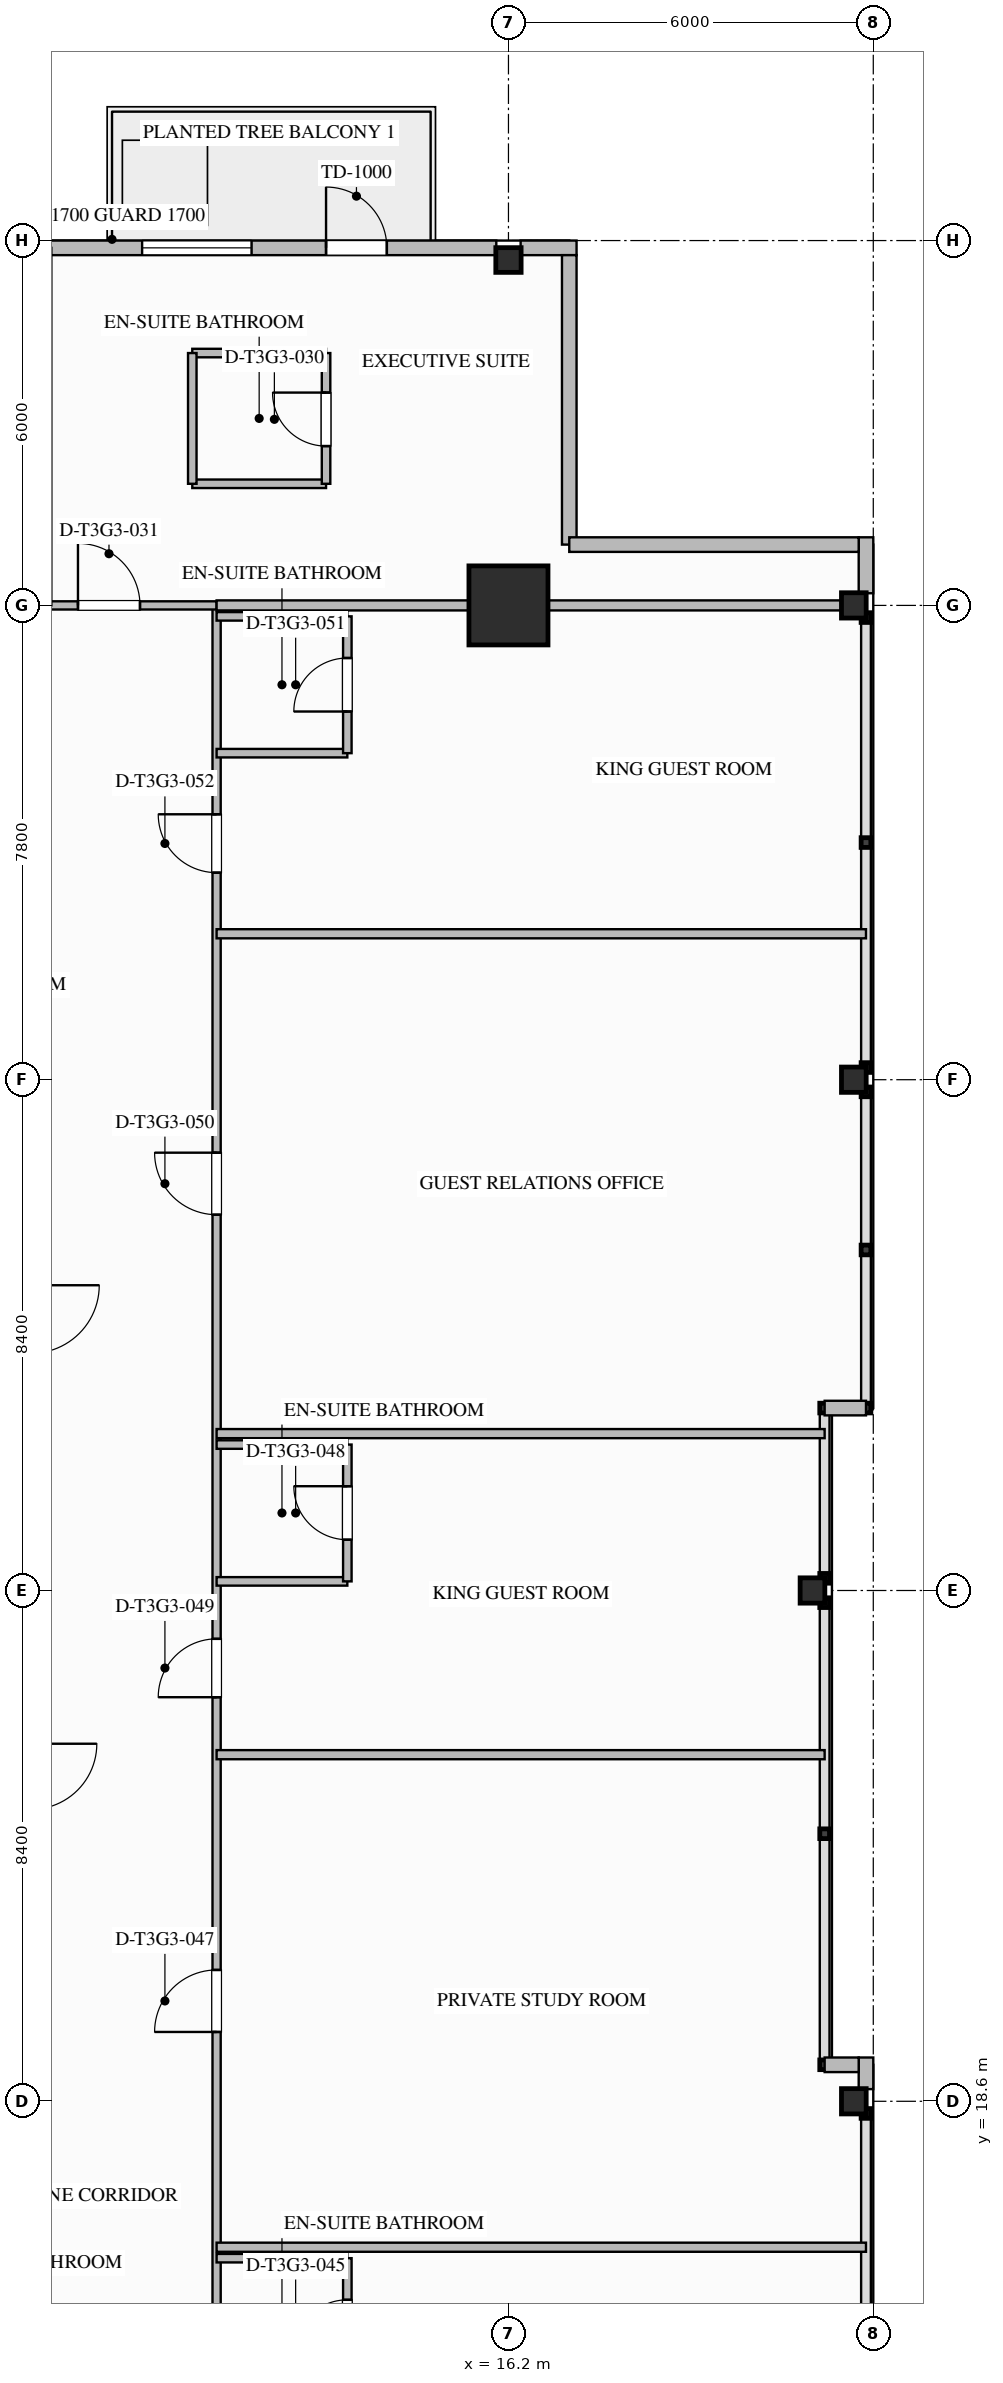
"""IFC4 building model, lengths in metres.
Left out: names, types, materials, properties, quantities, classifications, styles, units other than length and angle.
Written with IfcOpenShell. Run it as: python <this file> out.ifc"""

import sys

from ifc_helpers import new_model, si_unit, direction, frame, frame_2d, origin, origin_2d, place, context, subcontext, project, spatial, rectangle, i_section, extrude, element, fill, save


model = new_model("IFC4")
c1 = context("Model", 3, precision=1e-05, world=origin(), true_north=direction((0.0, 1.0)))
c2 = subcontext(c1, "Body", "Model", "MODEL_VIEW")
j1 = project(units=[si_unit("LENGTHUNIT", "METRE"), si_unit("PLANEANGLEUNIT", "RADIAN")], contexts=[c1])
p1 = place(None, origin())
s1 = spatial("IfcSite", under=j1, at=p1, CompositionType="ELEMENT")
p2 = place(p1, origin())
s2 = spatial("IfcBuilding", under=s1, at=p2, CompositionType="ELEMENT")
p3 = place(p2, frame((0.0, 0.0, 171.7)))
s3 = spatial("IfcBuildingStorey", under=s2, at=p3, CompositionType="ELEMENT", Elevation=171.7)
p4 = place(p3, frame((16.2, 43.2, 0.0), z_axis=(0.0, 0.0, 1.0), x_axis=(1.0, 0.0, 0.0)))
e1 = element("IfcColumn", 1, at=p4, inside=s3, PredefinedType="COLUMN", context=c2, shape_type="SweptSolid", body=[
    extrude(rectangle(XDim=1.3, YDim=1.3, at=origin_2d()), origin(), (0.0, 0.0, 1.0), 3.55),
])
for number, where, z_axis, x_axis in (
    (2, (21.88, 18.6, 0.0), (0.0, 0.0, 1.0), (1.0, 0.0, 0.0)),
    (3, (21.2, 27.0, 0.0), (0.0, 0.0, 1.0), (1.0, 0.0, 0.0)),
    (4, (21.88, 35.4, 0.0), (0.0, 0.0, 1.0), (1.0, 0.0, 0.0)),
    (5, (21.88, 43.2, 0.0), (0.0, 0.0, 1.0), (1.0, 0.0, 0.0)),
    (6, (16.2, 48.88, 0.0), (0.0, 0.0, 1.0), (0.0, 1.0, 0.0)),
):
    element("IfcColumn", number, at=place(p3, frame(where, z_axis=z_axis, x_axis=x_axis)), inside=s3, PredefinedType="COLUMN", context=c2, shape_type="SweptSolid", body=[
        extrude(i_section(OverallWidth=0.406, OverallDepth=0.416, WebThickness=0.03, FlangeThickness=0.048, FilletRadius=0.028, at=origin_2d()), origin(), (0.0, 0.0, 1.0), 3.547),
    ])
p5 = place(p3, frame((22.08, 44.32, 0.0), z_axis=(0.0, 0.0, 1.0), x_axis=(0.0, -1.0, 0.0)))
e7 = element("IfcWall", 7, at=p5, inside=s3, PredefinedType="STANDARD", context=c2, shape_type="SweptSolid", body=[
    extrude(rectangle(XDim=0.92, YDim=0.24, at=frame_2d((0.46, 0.0))), origin(), (0.0, 0.0, 1.0), 3.29),
])
p6 = place(p3, frame((22.08, 19.32, 0.0), z_axis=(0.0, 0.0, 1.0), x_axis=(0.0, -1.0, 0.0)))
e8 = element("IfcWall", 8, at=p6, inside=s3, PredefinedType="STANDARD", context=c2, shape_type="SweptSolid", body=[
    extrude(rectangle(XDim=0.52, YDim=0.24, at=frame_2d((0.26, 0.0))), origin(), (0.0, 0.0, 1.0), 3.29),
])
p7 = place(p3, frame((8.6, 49.08, 0.0), z_axis=(0.0, 0.0, 1.0), x_axis=(1.0, 0.0, 0.0)))
e9 = element("IfcWall", 9, at=p7, inside=s3, PredefinedType="STANDARD", context=c2, shape_type="SweptSolid", body=[
    extrude(rectangle(XDim=7.4, YDim=0.24, at=frame_2d((3.7, 0.0))), origin(), (0.0, 0.0, 1.0), 2.753),
])
p8 = place(p7, frame((4.6, 0.0, 0.0)))
e10 = element("IfcOpeningElement", 10, at=p8, cuts=e9, PredefinedType="OPENING", context=c2, shape_type="SweptSolid", body=[
    extrude(rectangle(XDim=1.0, YDim=2.2, at=frame_2d((0.5, 1.1))), frame((0.0, 0.13, 0.0), z_axis=(0.0, -1.0, 0.0), x_axis=(1.0, 0.0, 0.0)), (0.0, 0.0, 1.0), 0.26),
])
p9 = place(p7, frame((1.575, 0.0, 0.75)))
e11 = element("IfcOpeningElement", 11, at=p9, cuts=e9, PredefinedType="OPENING", context=c2, shape_type="SweptSolid", body=[
    extrude(rectangle(XDim=1.8, YDim=1.903, at=frame_2d((0.9, 0.952))), frame((0.0, 0.13, 0.0), z_axis=(0.0, -1.0, 0.0), x_axis=(1.0, 0.0, 0.0)), (0.0, 0.0, 1.0), 0.26),
])
p10 = place(p3, frame((16.4, 49.08, 0.0), z_axis=(0.0, 0.0, 1.0), x_axis=(1.0, 0.0, 0.0)))
e12 = element("IfcWall", 12, at=p10, inside=s3, PredefinedType="STANDARD", context=c2, shape_type="SweptSolid", body=[
    extrude(rectangle(XDim=0.92, YDim=0.24, at=frame_2d((0.46, 0.0))), origin(), (0.0, 0.0, 1.0), 3.29),
])
for number, where, z_axis, x_axis in (
    (13, (17.2, 48.96, 0.0), (0.0, 0.0, 1.0), (0.0, -1.0, 0.0)),
    (14, (17.2, 44.2, 0.0), (0.0, 0.0, 1.0), (1.0, 0.0, 0.0)),
):
    element("IfcWall", number, at=place(p3, frame(where, z_axis=z_axis, x_axis=x_axis)), inside=s3, PredefinedType="STANDARD", context=c2, shape_type="SweptSolid", body=[
        extrude(rectangle(XDim=4.76, YDim=0.24, at=frame_2d((2.38, 0.0))), origin(), (0.0, 0.0, 1.0), 3.29),
    ])
p11 = place(p3, frame((22.08, 30.0, 0.0), z_axis=(0.0, 0.0, 1.0), x_axis=(-1.0, 0.0, 0.0)))
e15 = element("IfcWall", 15, at=p11, inside=s3, PredefinedType="STANDARD", context=c2, shape_type="SweptSolid", body=[
    extrude(rectangle(XDim=0.68, YDim=0.24, at=frame_2d((0.34, 0.0))), origin(), (0.0, 0.0, 1.0), 3.29),
])
p12 = place(p3, frame((21.4, 19.2, 0.0), z_axis=(0.0, 0.0, 1.0), x_axis=(1.0, 0.0, 0.0)))
e16 = element("IfcWall", 16, at=p12, inside=s3, PredefinedType="STANDARD", context=c2, shape_type="SweptSolid", body=[
    extrude(rectangle(XDim=0.56, YDim=0.24, at=frame_2d((0.28, 0.0))), origin(), (0.0, 0.0, 1.0), 3.29),
])
p13 = place(p3, frame((11.4, 10.8, 0.0), z_axis=(0.0, 0.0, 1.0), x_axis=(0.0, 1.0, 0.0)))
e17 = element("IfcWall", 17, at=p13, inside=s3, PredefinedType="PARTITIONING", context=c2, shape_type="SweptSolid", body=[
    extrude(rectangle(XDim=32.4, YDim=0.135, at=frame_2d((16.2, 0.0))), origin(), (0.0, 0.0, 1.0), 3.29),
])
p14 = place(p13, frame((1.005, 0.0, 0.0)))
e18 = element("IfcOpeningElement", 18, at=p14, cuts=e17, PredefinedType="OPENING", context=c2, shape_type="SweptSolid", body=[
    extrude(rectangle(XDim=0.96, YDim=2.15, at=frame_2d((0.48, 1.075))), frame((0.0, 0.077, 0.0), z_axis=(0.0, -1.0, 0.0), x_axis=(1.0, 0.0, 0.0)), (0.0, 0.0, 1.0), 0.155),
])
p15 = place(p13, frame((8.94, 0.0, 0.0)))
e19 = element("IfcOpeningElement", 19, at=p15, cuts=e17, PredefinedType="OPENING", context=c2, shape_type="SweptSolid", body=[
    extrude(rectangle(XDim=1.02, YDim=2.15, at=frame_2d((0.51, 1.075))), frame((0.0, 0.077, 0.0), z_axis=(0.0, -1.0, 0.0), x_axis=(1.0, 0.0, 0.0)), (0.0, 0.0, 1.0), 0.155),
])
p16 = place(p13, frame((14.445, 0.0, 0.0)))
e20 = element("IfcOpeningElement", 20, at=p16, cuts=e17, PredefinedType="OPENING", context=c2, shape_type="SweptSolid", body=[
    extrude(rectangle(XDim=0.96, YDim=2.15, at=frame_2d((0.48, 1.075))), frame((0.0, 0.077, 0.0), z_axis=(0.0, -1.0, 0.0), x_axis=(1.0, 0.0, 0.0)), (0.0, 0.0, 1.0), 0.155),
])
p17 = place(p13, frame((22.38, 0.0, 0.0)))
e21 = element("IfcOpeningElement", 21, at=p17, cuts=e17, PredefinedType="OPENING", context=c2, shape_type="SweptSolid", body=[
    extrude(rectangle(XDim=1.02, YDim=2.15, at=frame_2d((0.51, 1.075))), frame((0.0, 0.077, 0.0), z_axis=(0.0, -1.0, 0.0), x_axis=(1.0, 0.0, 0.0)), (0.0, 0.0, 1.0), 0.155),
])
p18 = place(p13, frame((28.005, 0.0, 0.0)))
e22 = element("IfcOpeningElement", 22, at=p18, cuts=e17, PredefinedType="OPENING", context=c2, shape_type="SweptSolid", body=[
    extrude(rectangle(XDim=0.96, YDim=2.15, at=frame_2d((0.48, 1.075))), frame((0.0, 0.077, 0.0), z_axis=(0.0, -1.0, 0.0), x_axis=(1.0, 0.0, 0.0)), (0.0, 0.0, 1.0), 0.155),
])
p19 = place(p3, frame((8.6, 43.2, 0.0), z_axis=(0.0, 0.0, 1.0), x_axis=(1.0, 0.0, 0.0)))
e23 = element("IfcWall", 23, at=p19, inside=s3, PredefinedType="PARTITIONING", context=c2, shape_type="SweptSolid", body=[
    extrude(rectangle(XDim=2.8, YDim=0.135, at=frame_2d((1.4, 0.0))), origin(), (0.0, 0.0, 1.0), 2.58),
])
p20 = place(p19, frame((0.52, 0.0, 0.0)))
e24 = element("IfcOpeningElement", 24, at=p20, cuts=e23, PredefinedType="OPENING", context=c2, shape_type="SweptSolid", body=[
    extrude(rectangle(XDim=1.02, YDim=2.15, at=frame_2d((0.51, 1.075))), frame((0.0, 0.077, 0.0), z_axis=(0.0, -1.0, 0.0), x_axis=(1.0, 0.0, 0.0)), (0.0, 0.0, 1.0), 0.155),
])
p21 = place(p3, frame((11.4, 43.2, 0.0), z_axis=(0.0, 0.0, 1.0), x_axis=(1.0, 0.0, 0.0)))
e25 = element("IfcWall", 25, at=p21, inside=s3, PredefinedType="PARTITIONING", context=c2, shape_type="SweptSolid", body=[
    extrude(rectangle(XDim=10.68, YDim=0.165, at=frame_2d((5.34, 0.0))), origin(), (0.0, 0.0, 1.0), 2.58),
])
for number, where, z_axis, x_axis in (
    (26, (11.0, 45.2, 0.0), (0.0, 0.0, 1.0), (1.0, 0.0, 0.0)),
    (27, (11.0, 47.35, 0.0), (0.0, 0.0, 1.0), (1.0, 0.0, 0.0)),
):
    element("IfcWall", number, at=place(p3, frame(where, z_axis=z_axis, x_axis=x_axis)), inside=s3, PredefinedType="PLUMBINGWALL", context=c2, shape_type="SweptSolid", body=[
        extrude(rectangle(XDim=2.2, YDim=0.14, at=frame_2d((1.1, 0.0))), origin(), (0.0, 0.0, 1.0), 3.29),
    ])
p22 = place(p3, frame((11.0, 45.2, 0.0), z_axis=(0.0, 0.0, 1.0), x_axis=(0.0, 1.0, 0.0)))
e28 = element("IfcWall", 28, at=p22, inside=s3, PredefinedType="PLUMBINGWALL", context=c2, shape_type="SweptSolid", body=[
    extrude(rectangle(XDim=2.15, YDim=0.14, at=frame_2d((1.075, 0.0))), origin(), (0.0, 0.0, 1.0), 3.29),
])
p23 = place(p3, frame((13.2, 45.2, 0.0), z_axis=(0.0, 0.0, 1.0), x_axis=(0.0, 1.0, 0.0)))
e29 = element("IfcWall", 29, at=p23, inside=s3, PredefinedType="PLUMBINGWALL", context=c2, shape_type="SweptSolid", body=[
    extrude(rectangle(XDim=2.15, YDim=0.14, at=frame_2d((1.075, 0.0))), origin(), (0.0, 0.0, 1.0), 3.29),
])
p24 = place(p23, frame((0.62, 0.0, 0.0)))
e30 = element("IfcOpeningElement", 30, at=p24, cuts=e29, PredefinedType="OPENING", context=c2, shape_type="SweptSolid", body=[
    extrude(rectangle(XDim=0.88, YDim=2.1, at=frame_2d((0.44, 1.05))), frame((0.0, 0.08, 0.0), z_axis=(0.0, -1.0, 0.0), x_axis=(1.0, 0.0, 0.0)), (0.0, 0.0, 1.0), 0.16),
])
p25 = place(p3, frame((11.4, 16.02, 0.0), z_axis=(0.0, 0.0, 1.0), x_axis=(1.0, 0.0, 0.0)))
e31 = element("IfcWall", 31, at=p25, inside=s3, PredefinedType="PLUMBINGWALL", context=c2, shape_type="SweptSolid", body=[
    extrude(rectangle(XDim=2.15, YDim=0.14, at=frame_2d((1.075, 0.0))), origin(), (0.0, 0.0, 1.0), 3.29),
])
p26 = place(p3, frame((13.55, 13.77, 0.0), z_axis=(0.0, 0.0, 1.0), x_axis=(0.0, 1.0, 0.0)))
e32 = element("IfcWall", 32, at=p26, inside=s3, PredefinedType="PLUMBINGWALL", context=c2, shape_type="SweptSolid", body=[
    extrude(rectangle(XDim=2.25, YDim=0.14, at=frame_2d((1.125, 0.0))), origin(), (0.0, 0.0, 1.0), 3.29),
])
p27 = place(p26, frame((0.685, 0.0, 0.0)))
e33 = element("IfcOpeningElement", 33, at=p27, cuts=e32, PredefinedType="OPENING", context=c2, shape_type="SweptSolid", body=[
    extrude(rectangle(XDim=0.88, YDim=2.1, at=frame_2d((0.44, 1.05))), frame((0.0, 0.08, 0.0), z_axis=(0.0, -1.0, 0.0), x_axis=(1.0, 0.0, 0.0)), (0.0, 0.0, 1.0), 0.16),
])
p28 = place(p3, frame((11.4, 16.2, 0.0), z_axis=(0.0, 0.0, 1.0), x_axis=(1.0, 0.0, 0.0)))
e34 = element("IfcWall", 34, at=p28, inside=s3, PredefinedType="PARTITIONING", context=c2, shape_type="SweptSolid", body=[
    extrude(rectangle(XDim=10.68, YDim=0.15, at=frame_2d((5.34, 0.0))), origin(), (0.0, 0.0, 1.0), 3.29),
])
p29 = place(p3, frame((11.4, 24.3, 0.0), z_axis=(0.0, 0.0, 1.0), x_axis=(1.0, 0.0, 0.0)))
e35 = element("IfcWall", 35, at=p29, inside=s3, PredefinedType="PARTITIONING", context=c2, shape_type="SweptSolid", body=[
    extrude(rectangle(XDim=10.0, YDim=0.15, at=frame_2d((5.0, 0.0))), origin(), (0.0, 0.0, 1.0), 3.29),
])
p30 = place(p3, frame((11.4, 27.15, 0.0), z_axis=(0.0, 0.0, 1.0), x_axis=(1.0, 0.0, 0.0)))
e36 = element("IfcWall", 36, at=p30, inside=s3, PredefinedType="PLUMBINGWALL", context=c2, shape_type="SweptSolid", body=[
    extrude(rectangle(XDim=2.15, YDim=0.14, at=frame_2d((1.075, 0.0))), origin(), (0.0, 0.0, 1.0), 2.667),
])
p31 = place(p3, frame((11.4, 29.4, 0.0), z_axis=(0.0, 0.0, 1.0), x_axis=(1.0, 0.0, 0.0)))
e37 = element("IfcWall", 37, at=p31, inside=s3, PredefinedType="PLUMBINGWALL", context=c2, shape_type="SweptSolid", body=[
    extrude(rectangle(XDim=2.15, YDim=0.14, at=frame_2d((1.075, 0.0))), origin(), (0.0, 0.0, 1.0), 3.29),
])
p32 = place(p3, frame((13.55, 27.15, 0.0), z_axis=(0.0, 0.0, 1.0), x_axis=(0.0, 1.0, 0.0)))
e38 = element("IfcWall", 38, at=p32, inside=s3, PredefinedType="PLUMBINGWALL", context=c2, shape_type="SweptSolid", body=[
    extrude(rectangle(XDim=2.25, YDim=0.14, at=frame_2d((1.125, 0.0))), origin(), (0.0, 0.0, 1.0), 3.29),
])
p33 = place(p32, frame((0.685, 0.0, 0.0)))
e39 = element("IfcOpeningElement", 39, at=p33, cuts=e38, PredefinedType="OPENING", context=c2, shape_type="SweptSolid", body=[
    extrude(rectangle(XDim=0.88, YDim=2.1, at=frame_2d((0.44, 1.05))), frame((0.0, 0.08, 0.0), z_axis=(0.0, -1.0, 0.0), x_axis=(1.0, 0.0, 0.0)), (0.0, 0.0, 1.0), 0.16),
])
p34 = place(p3, frame((11.4, 29.58, 0.0), z_axis=(0.0, 0.0, 1.0), x_axis=(1.0, 0.0, 0.0)))
e40 = element("IfcWall", 40, at=p34, inside=s3, PredefinedType="PARTITIONING", context=c2, shape_type="SweptSolid", body=[
    extrude(rectangle(XDim=10.0, YDim=0.15, at=frame_2d((5.0, 0.0))), origin(), (0.0, 0.0, 1.0), 3.29),
])
p35 = place(p3, frame((11.4, 37.8, 0.0), z_axis=(0.0, 0.0, 1.0), x_axis=(1.0, 0.0, 0.0)))
e41 = element("IfcWall", 41, at=p35, inside=s3, PredefinedType="PARTITIONING", context=c2, shape_type="SweptSolid", body=[
    extrude(rectangle(XDim=10.68, YDim=0.15, at=frame_2d((5.34, 0.0))), origin(), (0.0, 0.0, 1.0), 3.29),
])
p36 = place(p3, frame((11.4, 40.77, 0.0), z_axis=(0.0, 0.0, 1.0), x_axis=(1.0, 0.0, 0.0)))
e42 = element("IfcWall", 42, at=p36, inside=s3, PredefinedType="PLUMBINGWALL", context=c2, shape_type="SweptSolid", body=[
    extrude(rectangle(XDim=2.15, YDim=0.14, at=frame_2d((1.075, 0.0))), origin(), (0.0, 0.0, 1.0), 3.29),
])
p37 = place(p3, frame((11.4, 43.02, 0.0), z_axis=(0.0, 0.0, 1.0), x_axis=(1.0, 0.0, 0.0)))
e43 = element("IfcWall", 43, at=p37, inside=s3, PredefinedType="PLUMBINGWALL", context=c2, shape_type="SweptSolid", body=[
    extrude(rectangle(XDim=2.15, YDim=0.14, at=frame_2d((1.075, 0.0))), origin(), (0.0, 0.0, 1.0), 2.58),
])
p38 = place(p3, frame((13.55, 40.77, 0.0), z_axis=(0.0, 0.0, 1.0), x_axis=(0.0, 1.0, 0.0)))
e44 = element("IfcWall", 44, at=p38, inside=s3, PredefinedType="PLUMBINGWALL", context=c2, shape_type="SweptSolid", body=[
    extrude(rectangle(XDim=2.25, YDim=0.14, at=frame_2d((1.125, 0.0))), origin(), (0.0, 0.0, 1.0), 3.29),
])
p39 = place(p38, frame((0.685, 0.0, 0.0)))
e45 = element("IfcOpeningElement", 45, at=p39, cuts=e44, PredefinedType="OPENING", context=c2, shape_type="SweptSolid", body=[
    extrude(rectangle(XDim=0.88, YDim=2.1, at=frame_2d((0.44, 1.05))), frame((0.0, 0.08, 0.0), z_axis=(0.0, -1.0, 0.0), x_axis=(1.0, 0.0, 0.0)), (0.0, 0.0, 1.0), 0.16),
])
p40 = place(p8, origin())
e46 = element("IfcDoor", 46, at=p40, inside=s3, OperationType="SINGLE_SWING_LEFT", PredefinedType="DOOR", context=c2, shape_type="SweptSolid", body=[
    extrude(rectangle(XDim=1.0, YDim=2.2, at=frame_2d((0.5, 1.1))), frame((0.0, 0.025, 0.0), z_axis=(0.0, -1.0, 0.0), x_axis=(1.0, 0.0, 0.0)), (0.0, 0.0, 1.0), 0.05),
])
fill(e10, e46)
p41 = place(p9, origin())
e47 = element("IfcWindow", 47, at=p41, inside=s3, PartitioningType="SINGLE_PANEL", PredefinedType="WINDOW", context=c2, shape_type="SweptSolid", body=[
    extrude(rectangle(XDim=1.8, YDim=1.903, at=frame_2d((0.9, 0.952))), frame((0.0, 0.03, 0.0), z_axis=(0.0, -1.0, 0.0), x_axis=(1.0, 0.0, 0.0)), (0.0, 0.0, 1.0), 0.06),
])
fill(e11, e47)
p42 = place(p24, origin())
e48 = element("IfcDoor", 48, at=p42, inside=s3, OperationType="SINGLE_SWING_RIGHT", PredefinedType="DOOR", context=c2, shape_type="SweptSolid", body=[
    extrude(rectangle(XDim=0.88, YDim=2.1, at=frame_2d((0.44, 1.05))), frame((0.0, 0.025, 0.0), z_axis=(0.0, -1.0, 0.0), x_axis=(1.0, 0.0, 0.0)), (0.0, 0.0, 1.0), 0.05),
])
fill(e30, e48)
p43 = place(p20, origin())
e49 = element("IfcDoor", 49, at=p43, inside=s3, OperationType="SINGLE_SWING_LEFT", PredefinedType="DOOR", context=c2, shape_type="SweptSolid", body=[
    extrude(rectangle(XDim=1.02, YDim=2.15, at=frame_2d((0.51, 1.075))), frame((0.0, 0.025, 0.0), z_axis=(0.0, -1.0, 0.0), x_axis=(1.0, 0.0, 0.0)), (0.0, 0.0, 1.0), 0.05),
])
fill(e24, e49)
p44 = place(p27, origin())
e50 = element("IfcDoor", 50, at=p44, inside=s3, OperationType="SINGLE_SWING_LEFT", PredefinedType="DOOR", context=c2, shape_type="SweptSolid", body=[
    extrude(rectangle(XDim=0.88, YDim=2.1, at=frame_2d((0.44, 1.05))), frame((0.0, 0.025, 0.0), z_axis=(0.0, -1.0, 0.0), x_axis=(1.0, 0.0, 0.0)), (0.0, 0.0, 1.0), 0.05),
])
fill(e33, e50)
p45 = place(p15, origin())
e51 = element("IfcDoor", 51, at=p45, inside=s3, OperationType="SINGLE_SWING_LEFT", PredefinedType="DOOR", context=c2, shape_type="SweptSolid", body=[
    extrude(rectangle(XDim=1.02, YDim=2.15, at=frame_2d((0.51, 1.075))), frame((0.0, 0.025, 0.0), z_axis=(0.0, -1.0, 0.0), x_axis=(1.0, 0.0, 0.0)), (0.0, 0.0, 1.0), 0.05),
])
fill(e19, e51)
p46 = place(p33, origin())
e52 = element("IfcDoor", 52, at=p46, inside=s3, OperationType="SINGLE_SWING_RIGHT", PredefinedType="DOOR", context=c2, shape_type="SweptSolid", body=[
    extrude(rectangle(XDim=0.88, YDim=2.1, at=frame_2d((0.44, 1.05))), frame((0.0, 0.025, 0.0), z_axis=(0.0, -1.0, 0.0), x_axis=(1.0, 0.0, 0.0)), (0.0, 0.0, 1.0), 0.05),
])
fill(e39, e52)
p47 = place(p16, origin())
e53 = element("IfcDoor", 53, at=p47, inside=s3, OperationType="SINGLE_SWING_LEFT", PredefinedType="DOOR", context=c2, shape_type="SweptSolid", body=[
    extrude(rectangle(XDim=0.96, YDim=2.15, at=frame_2d((0.48, 1.075))), frame((0.0, 0.025, 0.0), z_axis=(0.0, -1.0, 0.0), x_axis=(1.0, 0.0, 0.0)), (0.0, 0.0, 1.0), 0.05),
])
fill(e20, e53)
p48 = place(p17, origin())
e54 = element("IfcDoor", 54, at=p48, inside=s3, OperationType="SINGLE_SWING_RIGHT", PredefinedType="DOOR", context=c2, shape_type="SweptSolid", body=[
    extrude(rectangle(XDim=1.02, YDim=2.15, at=frame_2d((0.51, 1.075))), frame((0.0, 0.025, 0.0), z_axis=(0.0, -1.0, 0.0), x_axis=(1.0, 0.0, 0.0)), (0.0, 0.0, 1.0), 0.05),
])
fill(e21, e54)
p49 = place(p39, origin())
e55 = element("IfcDoor", 55, at=p49, inside=s3, OperationType="SINGLE_SWING_LEFT", PredefinedType="DOOR", context=c2, shape_type="SweptSolid", body=[
    extrude(rectangle(XDim=0.88, YDim=2.1, at=frame_2d((0.44, 1.05))), frame((0.0, 0.025, 0.0), z_axis=(0.0, -1.0, 0.0), x_axis=(1.0, 0.0, 0.0)), (0.0, 0.0, 1.0), 0.05),
])
fill(e45, e55)
p50 = place(p18, origin())
e56 = element("IfcDoor", 56, at=p50, inside=s3, OperationType="SINGLE_SWING_RIGHT", PredefinedType="DOOR", context=c2, shape_type="SweptSolid", body=[
    extrude(rectangle(XDim=0.96, YDim=2.15, at=frame_2d((0.48, 1.075))), frame((0.0, 0.025, 0.0), z_axis=(0.0, -1.0, 0.0), x_axis=(1.0, 0.0, 0.0)), (0.0, 0.0, 1.0), 0.05),
])
fill(e22, e56)
save(model, sys.argv[1])
